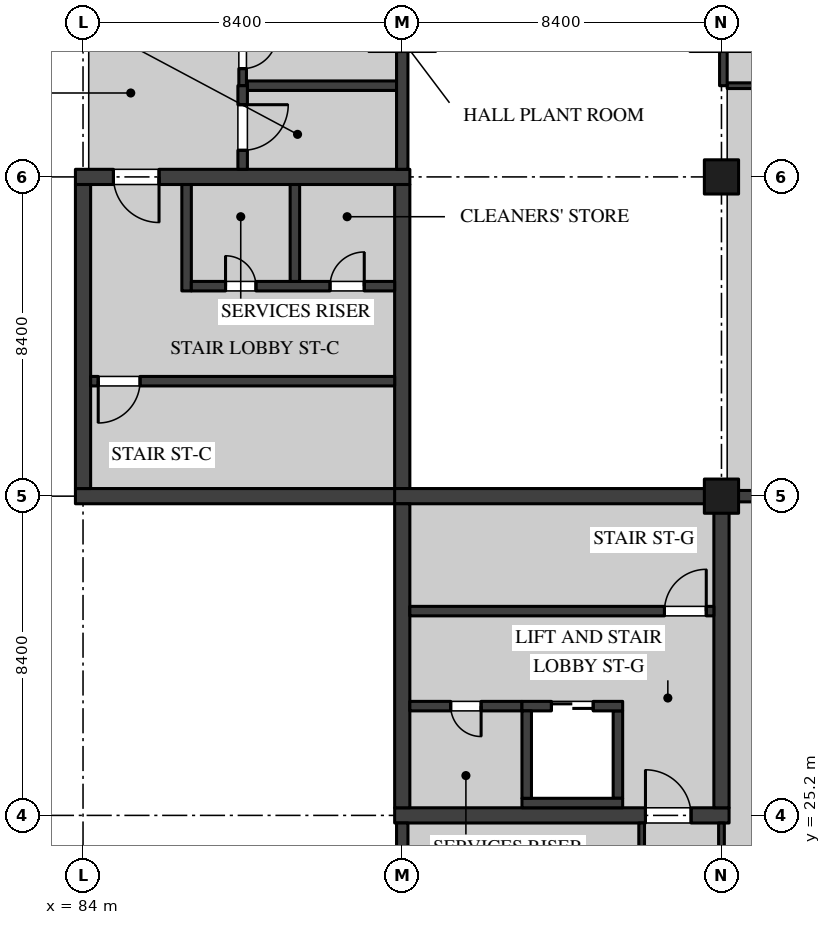
"""IFC4 building model, lengths in metres.
Left out: names, types, materials, properties, quantities, classifications, styles, units other than length and angle.
Written with IfcOpenShell. Run it as: python <this file> out.ifc"""

import sys

from ifc_helpers import new_model, si_unit, direction, frame, frame_2d, origin, origin_2d, place, context, subcontext, project, spatial, polyline, rectangle, outline, extrude, element, fill, save


model = new_model("IFC4")
c1 = context("Model", 3, precision=1e-05, world=origin(), true_north=direction((0.0, 1.0)))
c2 = subcontext(c1, "Body", "Model", "MODEL_VIEW")
j1 = project(units=[si_unit("LENGTHUNIT", "METRE"), si_unit("PLANEANGLEUNIT", "RADIAN")], contexts=[c1])
p1 = place(None, origin())
s1 = spatial("IfcSite", under=j1, at=p1, CompositionType="ELEMENT")
p2 = place(p1, origin())
s2 = spatial("IfcBuilding", under=s1, at=p2, CompositionType="ELEMENT")
p3 = place(p2, frame((0.0, 0.0, 5.4)))
s3 = spatial("IfcBuildingStorey", under=s2, at=p3, CompositionType="ELEMENT", Elevation=5.4)
p4 = place(p3, frame((100.8, 33.6, 3.0), z_axis=(0.0, 0.0, 1.0), x_axis=(1.0, 0.0, 0.0)))
e1 = element("IfcColumn", 1, at=p4, inside=s3, PredefinedType="COLUMN", context=c2, shape_type="SweptSolid", body=[
    extrude(rectangle(XDim=0.9, YDim=0.9, at=origin_2d()), origin(), (0.0, 0.0, 1.0), 1.37),
])
p5 = place(p3, frame((100.8, 42.0, 0.0), z_axis=(0.0, 0.0, 1.0), x_axis=(1.0, 0.0, 0.0)))
e2 = element("IfcColumn", 2, at=p5, inside=s3, PredefinedType="COLUMN", context=c2, shape_type="SweptSolid", body=[
    extrude(rectangle(XDim=0.9, YDim=0.9, at=origin_2d()), origin(), (0.0, 0.0, 1.0), 4.37),
])
p6 = place(p3, frame((83.8, 33.6, 0.0), z_axis=(0.0, 0.0, 1.0), x_axis=(1.0, 0.0, 0.0)))
e3 = element("IfcWall", 3, at=p6, inside=s3, PredefinedType="SHEAR", context=c2, shape_type="SweptSolid", body=[
    extrude(rectangle(XDim=8.8, YDim=0.4, at=frame_2d((4.4, 0.0))), origin(), (0.0, 0.0, 1.0), 4.25),
])
p7 = place(p3, frame((83.8, 42.0, 0.0), z_axis=(0.0, 0.0, 1.0), x_axis=(1.0, 0.0, 0.0)))
e4 = element("IfcWall", 4, at=p7, inside=s3, PredefinedType="SHEAR", context=c2, shape_type="SweptSolid", body=[
    extrude(rectangle(XDim=8.8, YDim=0.4, at=frame_2d((4.4, 0.0))), origin(), (0.0, 0.0, 1.0), 4.25),
])
p8 = place(p7, frame((1.0, 0.0, 0.0)))
e5 = element("IfcOpeningElement", 5, at=p8, cuts=e4, PredefinedType="OPENING", context=c2, shape_type="SweptSolid", body=[
    extrude(rectangle(XDim=1.2, YDim=2.1, at=frame_2d((0.6, 1.05))), frame((0.0, 0.21, 0.0), z_axis=(0.0, -1.0, 0.0), x_axis=(1.0, 0.0, 0.0)), (0.0, 0.0, 1.0), 0.42),
])
for number, where, z_axis, x_axis in (
    (6, (84.0, 33.8, 0.0), (0.0, 0.0, 1.0), (0.0, 1.0, 0.0)),
    (7, (92.4, 33.8, 0.0), (0.0, 0.0, 1.0), (0.0, 1.0, 0.0)),
):
    element("IfcWall", number, at=place(p3, frame(where, z_axis=z_axis, x_axis=x_axis)), inside=s3, PredefinedType="SHEAR", context=c2, shape_type="SweptSolid", body=[
        extrude(rectangle(XDim=8.0, YDim=0.4, at=frame_2d((4.0, 0.0))), origin(), (0.0, 0.0, 1.0), 4.25),
    ])
p9 = place(p3, frame((84.2, 36.625, 0.0), z_axis=(0.0, 0.0, 1.0), x_axis=(1.0, 0.0, 0.0)))
e8 = element("IfcWall", 8, at=p9, inside=s3, PredefinedType="SOLIDWALL", context=c2, shape_type="SweptSolid", body=[
    extrude(rectangle(XDim=8.0, YDim=0.25, at=frame_2d((4.0, 0.0))), origin(), (0.0, 0.0, 1.0), 4.25),
])
p10 = place(p9, frame((0.2, 0.0, 0.0)))
e9 = element("IfcOpeningElement", 9, at=p10, cuts=e8, PredefinedType="OPENING", context=c2, shape_type="SweptSolid", body=[
    extrude(rectangle(XDim=1.1, YDim=2.1, at=frame_2d((0.55, 1.05))), frame((0.0, 0.135, 0.0), z_axis=(0.0, -1.0, 0.0), x_axis=(1.0, 0.0, 0.0)), (0.0, 0.0, 1.0), 0.27),
])
p11 = place(p3, frame((86.725, 39.0, 0.0), z_axis=(0.0, 0.0, 1.0), x_axis=(0.0, 1.0, 0.0)))
e10 = element("IfcWall", 10, at=p11, inside=s3, PredefinedType="SOLIDWALL", context=c2, shape_type="SweptSolid", body=[
    extrude(rectangle(XDim=2.8, YDim=0.25, at=frame_2d((1.4, 0.0))), origin(), (0.0, 0.0, 1.0), 4.25),
])
p12 = place(p3, frame((86.85, 39.125, 0.0), z_axis=(0.0, 0.0, 1.0), x_axis=(1.0, 0.0, 0.0)))
e11 = element("IfcWall", 11, at=p12, inside=s3, PredefinedType="SOLIDWALL", context=c2, shape_type="SweptSolid", body=[
    extrude(rectangle(XDim=5.35, YDim=0.25, at=frame_2d((2.675, 0.0))), origin(), (0.0, 0.0, 1.0), 4.25),
])
p13 = place(p12, frame((3.65, 0.0, 0.0)))
e12 = element("IfcOpeningElement", 12, at=p13, cuts=e11, PredefinedType="OPENING", context=c2, shape_type="SweptSolid", body=[
    extrude(rectangle(XDim=0.9, YDim=2.1, at=frame_2d((0.45, 1.05))), frame((0.0, 0.135, 0.0), z_axis=(0.0, -1.0, 0.0), x_axis=(1.0, 0.0, 0.0)), (0.0, 0.0, 1.0), 0.27),
])
p14 = place(p12, frame((0.9, 0.0, 0.0)))
e13 = element("IfcOpeningElement", 13, at=p14, cuts=e11, PredefinedType="OPENING", context=c2, shape_type="SweptSolid", body=[
    extrude(rectangle(XDim=0.8, YDim=2.1, at=frame_2d((0.4, 1.05))), frame((0.0, 0.135, 0.0), z_axis=(0.0, -1.0, 0.0), x_axis=(1.0, 0.0, 0.0)), (0.0, 0.0, 1.0), 0.27),
])
p15 = place(p3, frame((89.575, 39.25, 0.0), z_axis=(0.0, 0.0, 1.0), x_axis=(0.0, 1.0, 0.0)))
e14 = element("IfcWall", 14, at=p15, inside=s3, PredefinedType="SOLIDWALL", context=c2, shape_type="SweptSolid", body=[
    extrude(rectangle(XDim=2.55, YDim=0.25, at=frame_2d((1.275, 0.0))), origin(), (0.0, 0.0, 1.0), 4.25),
])
p16 = place(p3, frame((92.2, 25.2, 0.0), z_axis=(0.0, 0.0, 1.0), x_axis=(1.0, 0.0, 0.0)))
e15 = element("IfcWall", 15, at=p16, inside=s3, PredefinedType="SHEAR", context=c2, shape_type="SweptSolid", body=[
    extrude(rectangle(XDim=8.8, YDim=0.4, at=frame_2d((4.4, 0.0))), origin(), (0.0, 0.0, 1.0), 3.0),
])
p17 = place(p16, frame((6.6, 0.0, 0.0)))
e16 = element("IfcOpeningElement", 16, at=p17, cuts=e15, PredefinedType="OPENING", context=c2, shape_type="SweptSolid", body=[
    extrude(rectangle(XDim=1.2, YDim=2.1, at=frame_2d((0.6, 1.05))), frame((0.0, 0.21, 0.0), z_axis=(0.0, -1.0, 0.0), x_axis=(1.0, 0.0, 0.0)), (0.0, 0.0, 1.0), 0.42),
])
p18 = place(p3, frame((92.2, 33.6, 0.0), z_axis=(0.0, 0.0, 1.0), x_axis=(1.0, 0.0, 0.0)))
e17 = element("IfcWall", 17, at=p18, inside=s3, PredefinedType="SHEAR", context=c2, shape_type="SweptSolid", body=[
    extrude(rectangle(XDim=8.8, YDim=0.4, at=frame_2d((4.4, 0.0))), origin(), (0.0, 0.0, 1.0), 3.0),
])
for number, where, z_axis, x_axis in (
    (18, (92.4, 25.4, 0.0), (0.0, 0.0, 1.0), (0.0, 1.0, 0.0)),
    (19, (100.8, 25.4, 0.0), (0.0, 0.0, 1.0), (0.0, 1.0, 0.0)),
):
    element("IfcWall", number, at=place(p3, frame(where, z_axis=z_axis, x_axis=x_axis)), inside=s3, PredefinedType="SHEAR", context=c2, shape_type="SweptSolid", body=[
        extrude(rectangle(XDim=8.0, YDim=0.4, at=frame_2d((4.0, 0.0))), origin(), (0.0, 0.0, 1.0), 3.0),
    ])
p19 = place(p3, frame((100.6, 30.575, 0.0), z_axis=(0.0, 0.0, 1.0), x_axis=(-1.0, 0.0, 0.0)))
e20 = element("IfcWall", 20, at=p19, inside=s3, PredefinedType="SOLIDWALL", context=c2, shape_type="SweptSolid", body=[
    extrude(rectangle(XDim=8.0, YDim=0.25, at=frame_2d((4.0, 0.0))), origin(), (0.0, 0.0, 1.0), 3.0),
])
p20 = place(p19, frame((0.2, 0.0, 0.0)))
e21 = element("IfcOpeningElement", 21, at=p20, cuts=e20, PredefinedType="OPENING", context=c2, shape_type="SweptSolid", body=[
    extrude(rectangle(XDim=1.1, YDim=2.1, at=frame_2d((0.55, 1.05))), frame((0.0, 0.135, 0.0), z_axis=(0.0, -1.0, 0.0), x_axis=(1.0, 0.0, 0.0)), (0.0, 0.0, 1.0), 0.27),
])
p21 = place(p3, frame((95.55, 28.075, 0.0), z_axis=(0.0, 0.0, 1.0), x_axis=(-1.0, 0.0, 0.0)))
e22 = element("IfcWall", 22, at=p21, inside=s3, PredefinedType="SOLIDWALL", context=c2, shape_type="SweptSolid", body=[
    extrude(rectangle(XDim=2.95, YDim=0.25, at=frame_2d((1.475, 0.0))), origin(), (0.0, 0.0, 1.0), 3.0),
])
p22 = place(p21, frame((1.075, 0.0, 0.0)))
e23 = element("IfcOpeningElement", 23, at=p22, cuts=e22, PredefinedType="OPENING", context=c2, shape_type="SweptSolid", body=[
    extrude(rectangle(XDim=0.8, YDim=2.1, at=frame_2d((0.4, 1.05))), frame((0.0, 0.135, 0.0), z_axis=(0.0, -1.0, 0.0), x_axis=(1.0, 0.0, 0.0)), (0.0, 0.0, 1.0), 0.27),
])
p23 = place(p3, frame((98.075, 25.65, 0.0), z_axis=(0.0, 0.0, 1.0), x_axis=(0.0, 1.0, 0.0)))
e24 = element("IfcWall", 24, at=p23, inside=s3, PredefinedType="SOLIDWALL", context=c2, shape_type="SweptSolid", body=[
    extrude(rectangle(XDim=2.3, YDim=0.25, at=frame_2d((1.15, 0.0))), origin(), (0.0, 0.0, 1.0), 3.0),
])
p24 = place(p3, frame((95.55, 28.075, 0.0), z_axis=(0.0, 0.0, 1.0), x_axis=(1.0, 0.0, 0.0)))
e25 = element("IfcWall", 25, at=p24, inside=s3, PredefinedType="SOLIDWALL", context=c2, shape_type="SweptSolid", body=[
    extrude(rectangle(XDim=2.65, YDim=0.25, at=frame_2d((1.325, 0.0))), origin(), (0.0, 0.0, 1.0), 3.0),
])
p25 = place(p24, frame((0.775, 0.0, 0.0)))
e26 = element("IfcOpeningElement", 26, at=p25, cuts=e25, PredefinedType="OPENING", context=c2, shape_type="SweptSolid", body=[
    extrude(rectangle(XDim=1.1, YDim=2.1, at=frame_2d((0.55, 1.05))), frame((0.0, 0.135, 0.0), z_axis=(0.0, -1.0, 0.0), x_axis=(1.0, 0.0, 0.0)), (0.0, 0.0, 1.0), 0.27),
])
p26 = place(p3, frame((95.55, 25.525, 0.0), z_axis=(0.0, 0.0, 1.0), x_axis=(1.0, 0.0, 0.0)))
e27 = element("IfcWall", 27, at=p26, inside=s3, PredefinedType="SOLIDWALL", context=c2, shape_type="SweptSolid", body=[
    extrude(rectangle(XDim=2.65, YDim=0.25, at=frame_2d((1.325, 0.0))), origin(), (0.0, 0.0, 1.0), 3.0),
])
p27 = place(p3, frame((95.675, 25.65, 0.0), z_axis=(0.0, 0.0, 1.0), x_axis=(0.0, 1.0, 0.0)))
e28 = element("IfcWall", 28, at=p27, inside=s3, PredefinedType="SOLIDWALL", context=c2, shape_type="SweptSolid", body=[
    extrude(rectangle(XDim=2.3, YDim=0.25, at=frame_2d((1.15, 0.0))), origin(), (0.0, 0.0, 1.0), 3.0),
])
p28 = place(p2, origin())
s4 = spatial("IfcBuildingStorey", under=s2, at=p28, CompositionType="ELEMENT", Elevation=0.0)
p29 = place(p28, frame((79.862, 37.8, 0.0), z_axis=(0.0, 0.0, 1.0), x_axis=(1.0, 0.0, 0.0)))
e29 = element("IfcWall", 29, at=p29, inside=s4, PredefinedType="PARTITIONING", context=c2, shape_type="SweptSolid", body=[
    extrude(rectangle(XDim=3.938, YDim=0.125, at=frame_2d((1.969, 0.0))), origin(), (0.0, 0.0, 1.0), 18.77),
])
p30 = place(p28, frame((84.0, 42.2, 0.0), z_axis=(0.0, 0.0, 1.0), x_axis=(0.0, 1.0, 0.0)))
e30 = element("IfcWall", 30, at=p30, inside=s4, PredefinedType="PARTITIONING", context=c2, shape_type="SweptSolid", body=[
    extrude(rectangle(XDim=4.0, YDim=0.2, at=frame_2d((2.0, 0.0))), origin(), (0.0, 0.0, 1.0), 18.77),
])
p31 = place(p30, frame((1.5, 0.0, 0.0)))
e31 = element("IfcOpeningElement", 31, at=p31, cuts=e30, PredefinedType="OPENING", context=c2, shape_type="SweptSolid", body=[
    extrude(rectangle(XDim=1.0, YDim=2.4, at=frame_2d((0.5, 1.2))), frame((0.0, 0.11, 0.0), z_axis=(0.0, -1.0, 0.0), x_axis=(1.0, 0.0, 0.0)), (0.0, 0.0, 1.0), 0.22),
])
p32 = place(p3, frame((88.2, 44.4, 0.0), z_axis=(0.0, 0.0, 1.0), x_axis=(0.0, 1.0, 0.0)))
e32 = element("IfcWall", 32, at=p32, inside=s3, PredefinedType="PARTITIONING", context=c2, shape_type="SweptSolid", body=[
    extrude(rectangle(XDim=1.8, YDim=0.2, at=frame_2d((0.9, 0.0))), origin(), (0.0, 0.0, 1.0), 4.25),
])
p33 = place(p32, frame((0.45, 0.0, 0.0)))
e33 = element("IfcOpeningElement", 33, at=p33, cuts=e32, PredefinedType="OPENING", context=c2, shape_type="SweptSolid", body=[
    extrude(rectangle(XDim=0.9, YDim=2.1, at=frame_2d((0.45, 1.05))), frame((0.0, 0.11, 0.0), z_axis=(0.0, -1.0, 0.0), x_axis=(1.0, 0.0, 0.0)), (0.0, 0.0, 1.0), 0.22),
])
p34 = place(p3, frame((88.325, 44.4, 0.0), z_axis=(0.0, 0.0, 1.0), x_axis=(1.0, 0.0, 0.0)))
e34 = element("IfcWall", 34, at=p34, inside=s3, PredefinedType="PARTITIONING", context=c2, shape_type="SweptSolid", body=[
    extrude(rectangle(XDim=3.925, YDim=0.25, at=frame_2d((1.962, 0.0))), origin(), (0.0, 0.0, 1.0), 4.25),
])
p35 = place(p3, frame((88.2, 42.2, 0.0), z_axis=(0.0, 0.0, 1.0), x_axis=(0.0, 1.0, 0.0)))
e35 = element("IfcWall", 35, at=p35, inside=s3, PredefinedType="PARTITIONING", context=c2, shape_type="SweptSolid", body=[
    extrude(rectangle(XDim=2.2, YDim=0.25, at=frame_2d((1.1, 0.0))), origin(), (0.0, 0.0, 1.0), 4.25),
])
p36 = place(p35, frame((0.5, 0.0, 0.0)))
e36 = element("IfcOpeningElement", 36, at=p36, cuts=e35, PredefinedType="OPENING", context=c2, shape_type="SweptSolid", body=[
    extrude(rectangle(XDim=1.2, YDim=2.4, at=frame_2d((0.6, 1.2))), frame((0.0, 0.135, 0.0), z_axis=(0.0, -1.0, 0.0), x_axis=(1.0, 0.0, 0.0)), (0.0, 0.0, 1.0), 0.27),
])
p37 = place(p3, frame((100.8, 18.825, 0.0), z_axis=(0.0, 0.0, 1.0), x_axis=(0.0, 1.0, 0.0)))
e37 = element("IfcWall", 37, at=p37, inside=s3, PredefinedType="PARTITIONING", context=c2, shape_type="SweptSolid", body=[
    extrude(rectangle(XDim=6.175, YDim=0.15, at=frame_2d((3.087, 0.0))), origin(), (0.0, 0.0, 1.0), 2.975),
])
p38 = place(p3, frame((98.7, 18.975, 0.0), z_axis=(0.0, 0.0, 1.0), x_axis=(0.0, 1.0, 0.0)))
e38 = element("IfcWall", 38, at=p38, inside=s3, PredefinedType="PARTITIONING", context=c2, shape_type="SweptSolid", body=[
    extrude(rectangle(XDim=6.025, YDim=0.15, at=frame_2d((3.012, 0.0))), origin(), (0.0, 0.0, 1.0), 4.37),
])
p39 = place(p38, frame((2.35, 0.0, 0.0)))
e39 = element("IfcOpeningElement", 39, at=p39, cuts=e38, PredefinedType="OPENING", context=c2, shape_type="SweptSolid", body=[
    extrude(rectangle(XDim=0.9, YDim=2.1, at=frame_2d((0.45, 1.05))), frame((0.0, 0.085, 0.0), z_axis=(0.0, -1.0, 0.0), x_axis=(1.0, 0.0, 0.0)), (0.0, 0.0, 1.0), 0.17),
])
p40 = place(p3, frame((100.95, 44.4, 0.0), z_axis=(0.0, 0.0, 1.0), x_axis=(1.0, 0.0, 0.0)))
e40 = element("IfcWall", 40, at=p40, inside=s3, PredefinedType="PARTITIONING", context=c2, shape_type="SweptSolid", body=[
    extrude(rectangle(XDim=2.42, YDim=0.15, at=frame_2d((1.21, 0.0))), origin(), (0.0, 0.0, 1.0), 4.37),
])
p41 = place(p3, frame((92.4, 25.0, 0.0), z_axis=(0.0, 0.0, 1.0), x_axis=(0.0, -1.0, 0.0)))
e41 = element("IfcWall", 41, at=p41, inside=s3, PredefinedType="SOLIDWALL", context=c2, shape_type="SweptSolid", body=[
    extrude(rectangle(XDim=7.9, YDim=0.3, at=frame_2d((3.95, 0.0))), origin(), (0.0, 0.0, 1.0), 2.975),
])
p42 = place(p3, frame((100.85, 48.0, 0.0), z_axis=(0.0, 0.0, 1.0), x_axis=(0.0, -1.0, 0.0)))
e42 = element("IfcWall", 42, at=p42, inside=s3, PredefinedType="SOLIDWALL", context=c2, shape_type="SweptSolid", body=[
    extrude(rectangle(XDim=3.6, YDim=0.2, at=frame_2d((1.8, 0.0))), origin(), (0.0, 0.0, 1.0), 3.746),
])
p43 = place(p42, frame((0.9, 0.0, 0.0)))
e43 = element("IfcOpeningElement", 43, at=p43, cuts=e42, PredefinedType="OPENING", context=c2, shape_type="SweptSolid", body=[
    extrude(rectangle(XDim=1.8, YDim=2.4, at=frame_2d((0.9, 1.2))), frame((0.0, 0.11, 0.0), z_axis=(0.0, -1.0, 0.0), x_axis=(1.0, 0.0, 0.0)), (0.0, 0.0, 1.0), 0.22),
])
p44 = place(p3, frame((92.4, 42.2, 0.0), z_axis=(0.0, 0.0, 1.0), x_axis=(0.0, 1.0, 0.0)))
e44 = element("IfcWall", 44, at=p44, inside=s3, PredefinedType="SOLIDWALL", context=c2, shape_type="SweptSolid", body=[
    extrude(rectangle(XDim=7.87, YDim=0.3, at=frame_2d((3.935, 0.0))), origin(), (0.0, 0.0, 1.0), 4.5),
])
p45 = place(p44, frame((3.1, 0.0, 0.0)))
e45 = element("IfcOpeningElement", 45, at=p45, cuts=e44, PredefinedType="OPENING", context=c2, shape_type="SweptSolid", body=[
    extrude(rectangle(XDim=1.8, YDim=2.4, at=frame_2d((0.9, 1.2))), frame((0.0, 0.16, 0.0), z_axis=(0.0, -1.0, 0.0), x_axis=(1.0, 0.0, 0.0)), (0.0, 0.0, 1.0), 0.32),
])
p46 = place(p3, frame((109.122, 33.6, 0.0), z_axis=(0.0, 0.0, 1.0), x_axis=(-1.0, 0.0, 0.0)))
e46 = element("IfcWall", 46, at=p46, inside=s3, PredefinedType="SOLIDWALL", context=c2, shape_type="SweptSolid", body=[
    extrude(outline(polyline([(0.0, 0.0), (8.122, 0.0), (8.122, 3.6), (7.872, 3.6), (0.122, 3.6), (0.0, 3.6), (0.0, 0.0)])), frame((0.0, 0.15, 0.0), z_axis=(0.0, -1.0, 0.0), x_axis=(1.0, 0.0, 0.0)), (0.0, 0.0, 1.0), 0.3),
])
p47 = place(p13, origin())
e47 = element("IfcDoor", 47, at=p47, inside=s3, OperationType="SINGLE_SWING_LEFT", PredefinedType="DOOR", context=c2, shape_type="SweptSolid", body=[
    extrude(rectangle(XDim=0.9, YDim=2.1, at=frame_2d((0.45, 1.05))), frame((0.0, 0.035, 0.0), z_axis=(0.0, -1.0, 0.0), x_axis=(1.0, 0.0, 0.0)), (0.0, 0.0, 1.0), 0.07),
])
fill(e12, e47)
p48 = place(p8, frame((1.2, 0.0, 0.0), z_axis=(0.0, 0.0, 1.0), x_axis=(-1.0, 0.0, 0.0)))
e48 = element("IfcDoor", 48, at=p48, inside=s3, OperationType="SINGLE_SWING_RIGHT", PredefinedType="DOOR", context=c2, shape_type="SweptSolid", body=[
    extrude(rectangle(XDim=1.2, YDim=2.1, at=frame_2d((0.6, 1.05))), frame((0.0, 0.035, 0.0), z_axis=(0.0, -1.0, 0.0), x_axis=(1.0, 0.0, 0.0)), (0.0, 0.0, 1.0), 0.07),
])
fill(e5, e48)
p49 = place(p14, origin())
e49 = element("IfcDoor", 49, at=p49, inside=s3, OperationType="SINGLE_SWING_RIGHT", PredefinedType="DOOR", context=c2, shape_type="SweptSolid", body=[
    extrude(rectangle(XDim=0.8, YDim=2.1, at=frame_2d((0.4, 1.05))), frame((0.0, 0.035, 0.0), z_axis=(0.0, -1.0, 0.0), x_axis=(1.0, 0.0, 0.0)), (0.0, 0.0, 1.0), 0.07),
])
fill(e13, e49)
p50 = place(p10, frame((1.1, 0.0, 0.0), z_axis=(0.0, 0.0, 1.0), x_axis=(-1.0, 0.0, 0.0)))
e50 = element("IfcDoor", 50, at=p50, inside=s3, OperationType="SINGLE_SWING_LEFT", PredefinedType="DOOR", context=c2, shape_type="SweptSolid", body=[
    extrude(rectangle(XDim=1.1, YDim=2.1, at=frame_2d((0.55, 1.05))), frame((0.0, 0.035, 0.0), z_axis=(0.0, -1.0, 0.0), x_axis=(1.0, 0.0, 0.0)), (0.0, 0.0, 1.0), 0.07),
])
fill(e9, e50)
p51 = place(p17, origin())
e51 = element("IfcDoor", 51, at=p51, inside=s3, OperationType="SINGLE_SWING_RIGHT", PredefinedType="DOOR", context=c2, shape_type="SweptSolid", body=[
    extrude(rectangle(XDim=1.2, YDim=2.1, at=frame_2d((0.6, 1.05))), frame((0.0, 0.035, 0.0), z_axis=(0.0, -1.0, 0.0), x_axis=(1.0, 0.0, 0.0)), (0.0, 0.0, 1.0), 0.07),
])
fill(e16, e51)
p52 = place(p22, origin())
e52 = element("IfcDoor", 52, at=p52, inside=s3, OperationType="SINGLE_SWING_RIGHT", PredefinedType="DOOR", context=c2, shape_type="SweptSolid", body=[
    extrude(rectangle(XDim=0.8, YDim=2.1, at=frame_2d((0.4, 1.05))), frame((0.0, 0.035, 0.0), z_axis=(0.0, -1.0, 0.0), x_axis=(1.0, 0.0, 0.0)), (0.0, 0.0, 1.0), 0.07),
])
fill(e23, e52)
p53 = place(p20, frame((1.1, 0.0, 0.0), z_axis=(0.0, 0.0, 1.0), x_axis=(-1.0, 0.0, 0.0)))
e53 = element("IfcDoor", 53, at=p53, inside=s3, OperationType="SINGLE_SWING_LEFT", PredefinedType="DOOR", context=c2, shape_type="SweptSolid", body=[
    extrude(rectangle(XDim=1.1, YDim=2.1, at=frame_2d((0.55, 1.05))), frame((0.0, 0.035, 0.0), z_axis=(0.0, -1.0, 0.0), x_axis=(1.0, 0.0, 0.0)), (0.0, 0.0, 1.0), 0.07),
])
fill(e21, e53)
p54 = place(p25, origin())
e54 = element("IfcDoor", 54, at=p54, inside=s3, OperationType="DOUBLE_DOOR_SLIDING", PredefinedType="DOOR", context=c2, shape_type="SweptSolid", body=[
    extrude(rectangle(XDim=1.1, YDim=2.1, at=frame_2d((0.55, 1.05))), frame((0.0, 0.04, 0.0), z_axis=(0.0, -1.0, 0.0), x_axis=(1.0, 0.0, 0.0)), (0.0, 0.0, 1.0), 0.08),
])
fill(e26, e54)
p55 = place(p33, frame((0.9, 0.0, 0.0), z_axis=(0.0, 0.0, 1.0), x_axis=(-1.0, 0.0, 0.0)))
e55 = element("IfcDoor", 55, at=p55, inside=s3, OperationType="SINGLE_SWING_RIGHT", PredefinedType="DOOR", context=c2, shape_type="SweptSolid", body=[
    extrude(rectangle(XDim=0.9, YDim=2.1, at=frame_2d((0.45, 1.05))), frame((0.0, 0.03, 0.0), z_axis=(0.0, -1.0, 0.0), x_axis=(1.0, 0.0, 0.0)), (0.0, 0.0, 1.0), 0.06),
])
fill(e33, e55)
p56 = place(p36, frame((1.2, 0.0, 0.0), z_axis=(0.0, 0.0, 1.0), x_axis=(-1.0, 0.0, 0.0)))
e56 = element("IfcDoor", 56, at=p56, inside=s3, OperationType="SINGLE_SWING_RIGHT", PredefinedType="DOOR", context=c2, shape_type="SweptSolid", body=[
    extrude(rectangle(XDim=1.2, YDim=2.4, at=frame_2d((0.6, 1.2))), frame((0.0, 0.05, 0.0), z_axis=(0.0, -1.0, 0.0), x_axis=(1.0, 0.0, 0.0)), (0.0, 0.0, 1.0), 0.1),
])
fill(e36, e56)
save(model, sys.argv[1])
